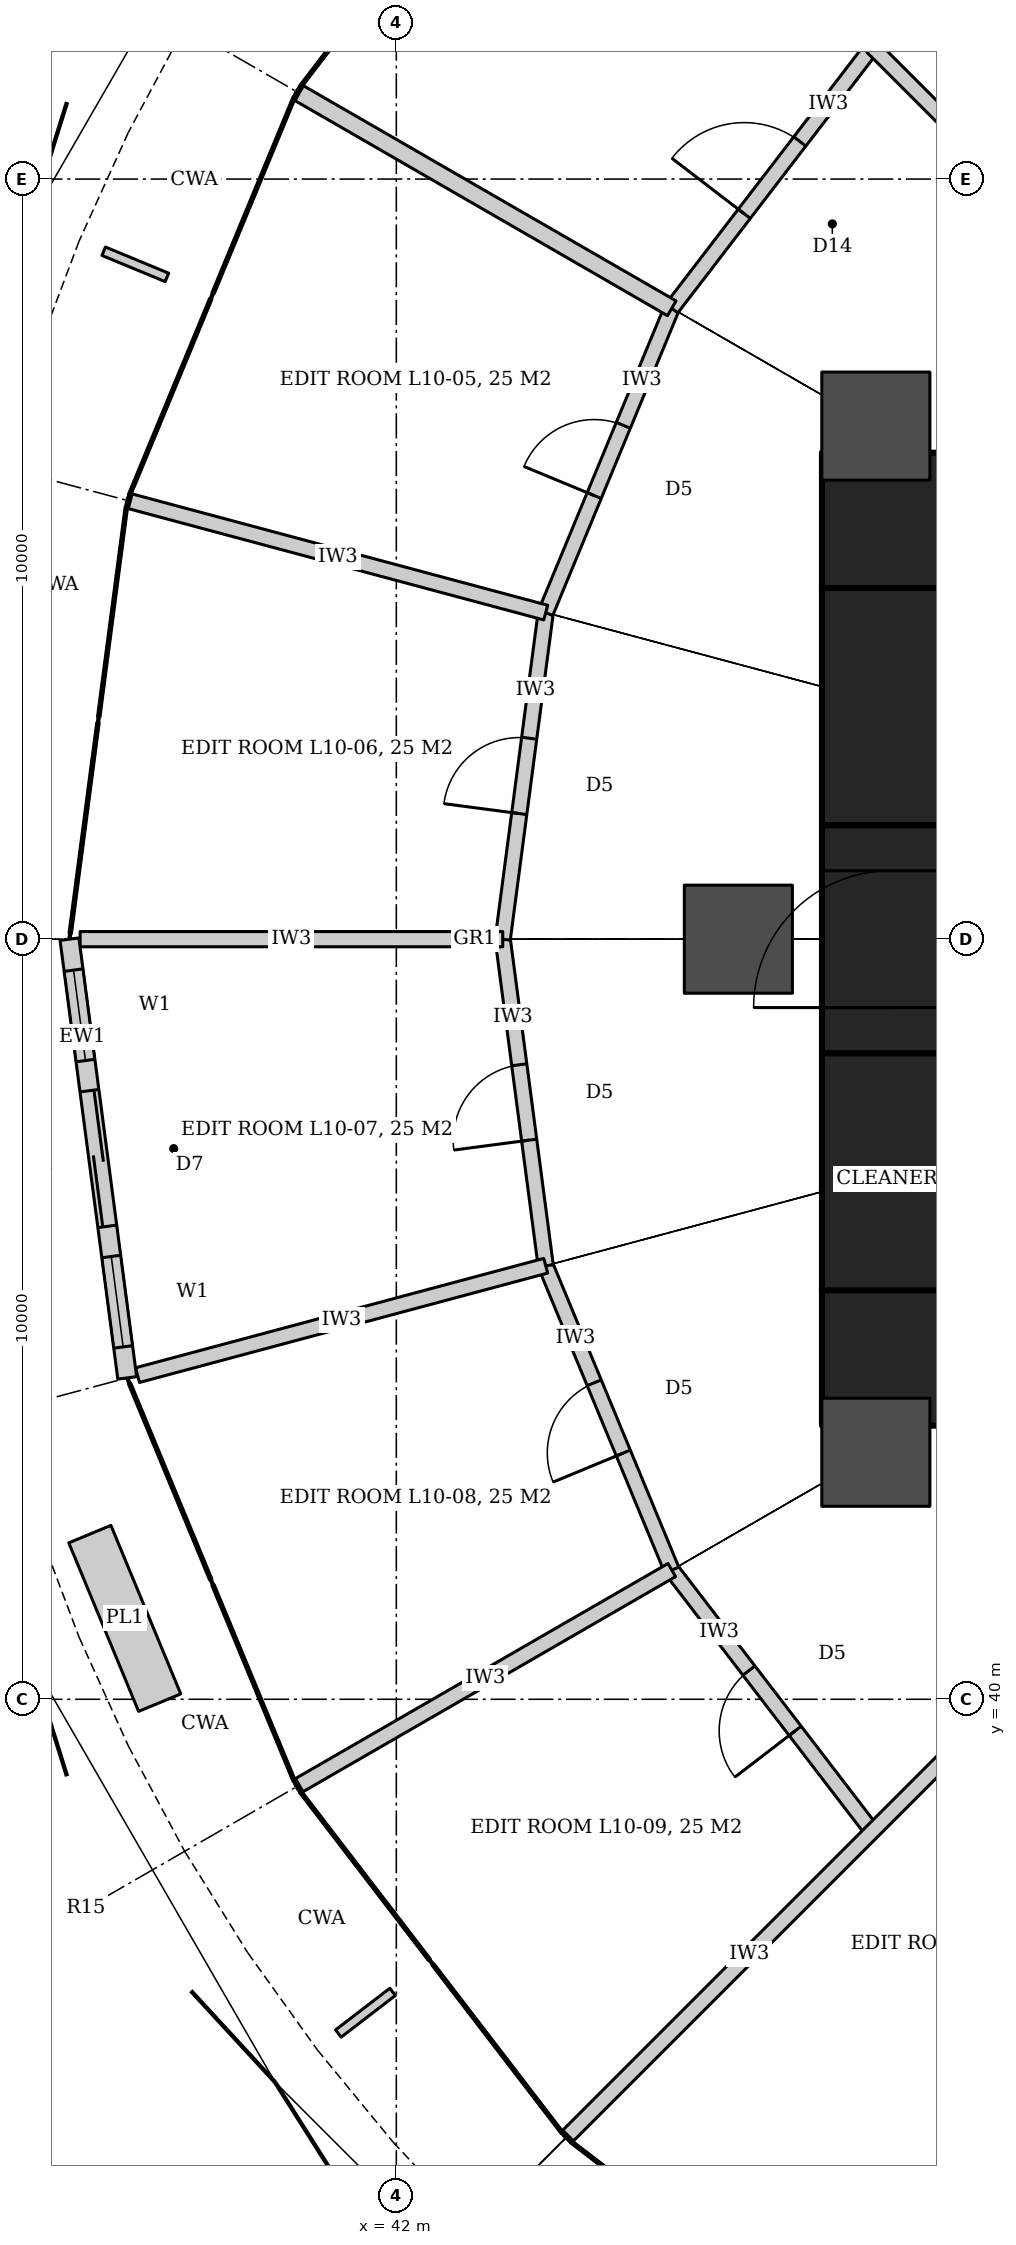
"""IFC4 building model, lengths in metres.
Left out: names, types, materials, properties, quantities, classifications, styles, units other than length and angle.
Written with IfcOpenShell. Run it as: python <this file> out.ifc"""

import sys

from ifc_helpers import new_model, si_unit, direction, frame, frame_2d, origin, origin_2d, place, context, subcontext, project, spatial, rectangle, hollow_circle, extrude, element, fill, save


model = new_model("IFC4")
c1 = context("Model", 3, precision=1e-05, world=origin(), true_north=direction((0.0, 1.0)))
c2 = subcontext(c1, "Body", "Model", "MODEL_VIEW")
j1 = project(units=[si_unit("LENGTHUNIT", "METRE"), si_unit("PLANEANGLEUNIT", "RADIAN")], contexts=[c1])
p1 = place(None, origin())
s1 = spatial("IfcSite", under=j1, at=p1, CompositionType="ELEMENT")
p2 = place(p1, origin())
s2 = spatial("IfcBuilding", under=s1, at=p2, CompositionType="ELEMENT")
p3 = place(p2, frame((0.0, 0.0, 42.8)))
s3 = spatial("IfcBuildingStorey", under=s2, at=p3, CompositionType="ELEMENT", Elevation=42.8)
for number, where, z_axis, x_axis in (
    (1, (47.6, 55.5, 0.0), (0.0, 0.0, 1.0), (1.0, 0.0, 0.0)),
    (2, (47.6, 44.5, 0.0), (0.0, 0.0, 1.0), (1.0, 0.0, 0.0)),
):
    element("IfcWall", number, at=place(p3, frame(where, z_axis=z_axis, x_axis=x_axis)), inside=s3, PredefinedType="SHEAR", context=c2, shape_type="SweptSolid", body=[
        extrude(rectangle(XDim=7.8, YDim=1.8, at=frame_2d((3.9, 0.0))), origin(), (0.0, 0.0, 1.0), 4.2),
    ])
p4 = place(p3, frame((48.5, 45.38, 0.0), z_axis=(0.0, 0.0, 1.0), x_axis=(0.0, 1.0, 0.0)))
e3 = element("IfcWall", 3, at=p4, inside=s3, PredefinedType="SHEAR", context=c2, shape_type="SweptSolid", body=[
    extrude(rectangle(XDim=3.32, YDim=1.8, at=frame_2d((1.66, 0.0))), origin(), (0.0, 0.0, 1.0), 4.2),
])
p5 = place(p3, frame((48.7, 48.7, 0.0), z_axis=(0.0, 0.0, 1.0), x_axis=(0.0, 1.0, 0.0)))
e4 = element("IfcWall", 4, at=p5, inside=s3, PredefinedType="SHEAR", context=c2, shape_type="SweptSolid", body=[
    extrude(rectangle(XDim=2.6, YDim=1.8, at=frame_2d((1.3, 0.0))), origin(), (0.0, 0.0, 1.0), 4.2),
])
p6 = place(p5, frame((0.4, 0.0, 0.0)))
e5 = element("IfcOpeningElement", 5, at=p6, cuts=e4, PredefinedType="OPENING", context=c2, shape_type="SweptSolid", body=[
    extrude(rectangle(XDim=1.8, YDim=2.1, at=frame_2d((0.9, 1.05))), frame((0.0, 0.91, 0.0), z_axis=(0.0, -1.0, 0.0), x_axis=(1.0, 0.0, 0.0)), (0.0, 0.0, 1.0), 1.82),
])
p7 = place(p3, frame((48.5, 51.3, 0.0), z_axis=(0.0, 0.0, 1.0), x_axis=(0.0, 1.0, 0.0)))
e6 = element("IfcWall", 6, at=p7, inside=s3, PredefinedType="SHEAR", context=c2, shape_type="SweptSolid", body=[
    extrude(rectangle(XDim=3.32, YDim=1.8, at=frame_2d((1.66, 0.0))), origin(), (0.0, 0.0, 1.0), 4.2),
])
for number, where, z_axis, x_axis in (
    (7, (48.309, 56.75, 0.0), (0.0, 0.0, 1.0), (1.0, 0.0, 0.0)),
    (8, (46.5, 50.0, 0.0), (0.0, 0.0, 1.0), (1.0, 0.0, 0.0)),
    (9, (48.309, 43.25, 0.0), (0.0, 0.0, 1.0), (1.0, 0.0, 0.0)),
):
    element("IfcColumn", number, at=place(p3, frame(where, z_axis=z_axis, x_axis=x_axis)), inside=s3, PredefinedType="COLUMN", context=c2, shape_type="SweptSolid", body=[
        extrude(hollow_circle(Radius=0.813, WallThickness=0.08, at=origin_2d()), origin(), (0.0, 0.0, 1.0), 4.2),
    ])
p8 = place(p3, frame((48.262, 38.262, 0.0), z_axis=(0.0, 0.0, 1.0), x_axis=(-0.60874374674, 0.79336690806, 0.0)))
e10 = element("IfcWall", 10, at=p8, inside=s3, PredefinedType="PARTITIONING", context=c2, shape_type="SweptSolid", body=[
    extrude(rectangle(XDim=4.333, YDim=0.2, at=frame_2d((2.167, 0.0))), origin(), (0.0, 0.0, 1.0), 3.04),
])
p9 = place(p8, frame((1.667, 0.0, 0.0)))
e11 = element("IfcOpeningElement", 11, at=p9, cuts=e10, PredefinedType="OPENING", context=c2, shape_type="SweptSolid", body=[
    extrude(rectangle(XDim=1.0, YDim=2.1, at=frame_2d((0.5, 1.05))), frame((0.0, 0.11, 0.0), z_axis=(0.0, -1.0, 0.0), x_axis=(1.0, 0.0, 0.0)), (0.0, 0.0, 1.0), 0.22),
])
p10 = place(p3, frame((45.624, 41.7, 0.0), z_axis=(0.0, 0.0, 1.0), x_axis=(-0.382698425325, 0.923873322082, 0.0)))
e12 = element("IfcWall", 12, at=p10, inside=s3, PredefinedType="PARTITIONING", context=c2, shape_type="SweptSolid", body=[
    extrude(rectangle(XDim=4.333, YDim=0.2, at=frame_2d((2.167, 0.0))), origin(), (0.0, 0.0, 1.0), 3.04),
])
p11 = place(p10, frame((1.667, 0.0, 0.0)))
e13 = element("IfcOpeningElement", 13, at=p11, cuts=e12, PredefinedType="OPENING", context=c2, shape_type="SweptSolid", body=[
    extrude(rectangle(XDim=1.0, YDim=2.1, at=frame_2d((0.5, 1.05))), frame((0.0, 0.11, 0.0), z_axis=(0.0, -1.0, 0.0), x_axis=(1.0, 0.0, 0.0)), (0.0, 0.0, 1.0), 0.22),
])
p12 = place(p3, frame((43.966, 45.704, 0.0), z_axis=(0.0, 0.0, 1.0), x_axis=(-0.130536124221, 0.99144355375, 0.0)))
e14 = element("IfcWall", 14, at=p12, inside=s3, PredefinedType="PARTITIONING", context=c2, shape_type="SweptSolid", body=[
    extrude(rectangle(XDim=4.333, YDim=0.2, at=frame_2d((2.167, 0.0))), origin(), (0.0, 0.0, 1.0), 3.04),
])
p13 = place(p12, frame((1.667, 0.0, 0.0)))
e15 = element("IfcOpeningElement", 15, at=p13, cuts=e14, PredefinedType="OPENING", context=c2, shape_type="SweptSolid", body=[
    extrude(rectangle(XDim=1.0, YDim=2.1, at=frame_2d((0.5, 1.05))), frame((0.0, 0.11, 0.0), z_axis=(0.0, -1.0, 0.0), x_axis=(1.0, 0.0, 0.0)), (0.0, 0.0, 1.0), 0.22),
])
p14 = place(p3, frame((43.4, 50.0, 0.0), z_axis=(0.0, 0.0, 1.0), x_axis=(0.130536124221, 0.99144355375, 0.0)))
e16 = element("IfcWall", 16, at=p14, inside=s3, PredefinedType="PARTITIONING", context=c2, shape_type="SweptSolid", body=[
    extrude(rectangle(XDim=4.333, YDim=0.2, at=frame_2d((2.167, 0.0))), origin(), (0.0, 0.0, 1.0), 3.04),
])
p15 = place(p14, frame((1.667, 0.0, 0.0)))
e17 = element("IfcOpeningElement", 17, at=p15, cuts=e16, PredefinedType="OPENING", context=c2, shape_type="SweptSolid", body=[
    extrude(rectangle(XDim=1.0, YDim=2.1, at=frame_2d((0.5, 1.05))), frame((0.0, 0.11, 0.0), z_axis=(0.0, -1.0, 0.0), x_axis=(1.0, 0.0, 0.0)), (0.0, 0.0, 1.0), 0.22),
])
p16 = place(p3, frame((43.966, 54.296, 0.0), z_axis=(0.0, 0.0, 1.0), x_axis=(0.382698425325, 0.923873322082, 0.0)))
e18 = element("IfcWall", 18, at=p16, inside=s3, PredefinedType="PARTITIONING", context=c2, shape_type="SweptSolid", body=[
    extrude(rectangle(XDim=4.333, YDim=0.2, at=frame_2d((2.167, 0.0))), origin(), (0.0, 0.0, 1.0), 3.04),
])
p17 = place(p16, frame((1.667, 0.0, 0.0)))
e19 = element("IfcOpeningElement", 19, at=p17, cuts=e18, PredefinedType="OPENING", context=c2, shape_type="SweptSolid", body=[
    extrude(rectangle(XDim=1.0, YDim=2.1, at=frame_2d((0.5, 1.05))), frame((0.0, 0.11, 0.0), z_axis=(0.0, -1.0, 0.0), x_axis=(1.0, 0.0, 0.0)), (0.0, 0.0, 1.0), 0.22),
])
p18 = place(p3, frame((45.624, 58.3, 0.0), z_axis=(0.0, 0.0, 1.0), x_axis=(0.60874374674, 0.79336690806, 0.0)))
e20 = element("IfcWall", 20, at=p18, inside=s3, PredefinedType="PARTITIONING", context=c2, shape_type="SweptSolid", body=[
    extrude(rectangle(XDim=4.333, YDim=0.2, at=frame_2d((2.167, 0.0))), origin(), (0.0, 0.0, 1.0), 3.04),
])
p19 = place(p18, frame((1.567, 0.0, 0.0)))
e21 = element("IfcOpeningElement", 21, at=p19, cuts=e20, PredefinedType="OPENING", context=c2, shape_type="SweptSolid", body=[
    extrude(rectangle(XDim=1.2, YDim=2.4, at=frame_2d((0.6, 1.2))), frame((0.0, 0.11, 0.0), z_axis=(0.0, -1.0, 0.0), x_axis=(1.0, 0.0, 0.0)), (0.0, 0.0, 1.0), 0.22),
])
p20 = place(p3, frame((48.262, 61.738, 0.0), z_axis=(0.0, 0.0, 1.0), x_axis=(0.707106781187, -0.707106781187, 0.0)))
e22 = element("IfcWall", 22, at=p20, inside=s3, PredefinedType="PARTITIONING", context=c2, shape_type="SweptSolid", body=[
    extrude(rectangle(XDim=3.872, YDim=0.2, at=frame_2d((1.936, 0.0))), origin(), (0.0, 0.0, 1.0), 3.02),
])
p21 = place(p3, frame((45.624, 58.3, 0.0), z_axis=(0.0, 0.0, 1.0), x_axis=(-0.866042189445, 0.499970925255, 0.0)))
e23 = element("IfcWall", 23, at=p21, inside=s3, PredefinedType="PARTITIONING", context=c2, shape_type="SweptSolid", body=[
    extrude(rectangle(XDim=5.16, YDim=0.225, at=frame_2d((2.58, 0.0))), origin(), (0.0, 0.0, 1.0), 3.04),
])
p22 = place(p3, frame((43.966, 54.296, 0.0), z_axis=(0.0, 0.0, 1.0), x_axis=(-0.965927988102, 0.258810976974, 0.0)))
e24 = element("IfcWall", 24, at=p22, inside=s3, PredefinedType="PARTITIONING", context=c2, shape_type="SweptSolid", body=[
    extrude(rectangle(XDim=5.16, YDim=0.2, at=frame_2d((2.58, 0.0))), origin(), (0.0, 0.0, 1.0), 3.04),
])
p23 = place(p3, frame((43.4, 50.0, 0.0), z_axis=(0.0, 0.0, 1.0), x_axis=(-1.0, 0.0, 0.0)))
e25 = element("IfcWall", 25, at=p23, inside=s3, PredefinedType="PARTITIONING", context=c2, shape_type="SweptSolid", body=[
    extrude(rectangle(XDim=5.06, YDim=0.2, at=frame_2d((2.53, 0.0))), origin(), (0.0, 0.0, 1.0), 3.04),
])
p24 = place(p3, frame((43.966, 45.704, 0.0), z_axis=(0.0, 0.0, 1.0), x_axis=(-0.965929961432, -0.258803612044, 0.0)))
e26 = element("IfcWall", 26, at=p24, inside=s3, PredefinedType="PARTITIONING", context=c2, shape_type="SweptSolid", body=[
    extrude(rectangle(XDim=5.06, YDim=0.2, at=frame_2d((2.53, 0.0))), origin(), (0.0, 0.0, 1.0), 3.04),
])
p25 = place(p3, frame((45.624, 41.7, 0.0), z_axis=(0.0, 0.0, 1.0), x_axis=(-0.866042189445, -0.499970925255, 0.0)))
e27 = element("IfcWall", 27, at=p25, inside=s3, PredefinedType="PARTITIONING", context=c2, shape_type="SweptSolid", body=[
    extrude(rectangle(XDim=5.16, YDim=0.2, at=frame_2d((2.58, 0.0))), origin(), (0.0, 0.0, 1.0), 3.04),
])
p26 = place(p3, frame((51.0, 41.0, 0.0), z_axis=(0.0, 0.0, 1.0), x_axis=(-0.707106781187, -0.707106781187, 0.0)))
e28 = element("IfcWall", 28, at=p26, inside=s3, PredefinedType="PARTITIONING", context=c2, shape_type="SweptSolid", body=[
    extrude(rectangle(XDim=9.032, YDim=0.2, at=frame_2d((4.516, 0.0))), origin(), (0.0, 0.0, 1.0), 3.02),
])
p27 = place(p26, frame((1.436, 0.0, 0.0)))
e29 = element("IfcOpeningElement", 29, at=p27, cuts=e28, PredefinedType="OPENING", context=c2, shape_type="SweptSolid", body=[
    extrude(rectangle(XDim=1.0, YDim=2.1, at=frame_2d((0.5, 1.05))), frame((0.0, 0.11, 0.0), z_axis=(0.0, -1.0, 0.0), x_axis=(1.0, 0.0, 0.0)), (0.0, 0.0, 1.0), 0.22),
])
p28 = place(p3, frame((52.701, 37.358, 0.0), z_axis=(0.0, 0.0, 1.0), x_axis=(-0.499970319043, -0.866042539415, 0.0)))
e30 = element("IfcWall", 30, at=p28, inside=s3, PredefinedType="PARTITIONING", context=c2, shape_type="SweptSolid", body=[
    extrude(rectangle(XDim=7.162, YDim=0.225, at=frame_2d((3.581, 0.0))), origin(), (0.0, 0.0, 1.0), 3.04),
])
p29 = place(p3, frame((38.2, 50.0, 0.0), z_axis=(0.0, 0.0, 1.0), x_axis=(0.130542179395, -0.991442756491, 0.0)))
e31 = element("IfcWall", 31, at=p29, inside=s3, PredefinedType="SOLIDWALL", context=c2, shape_type="SweptSolid", body=[
    extrude(rectangle(XDim=5.691, YDim=0.25, at=frame_2d((2.845, 0.0))), origin(), (0.0, 0.0, 1.0), 4.04),
])
p30 = place(p29, frame((1.946, 0.0, 0.0)))
e32 = element("IfcOpeningElement", 32, at=p30, cuts=e31, PredefinedType="OPENING", context=c2, shape_type="SweptSolid", body=[
    extrude(rectangle(XDim=1.8, YDim=2.4, at=frame_2d((0.9, 1.2))), frame((0.0, 0.135, 0.0), z_axis=(0.0, -1.0, 0.0), x_axis=(1.0, 0.0, 0.0)), (0.0, 0.0, 1.0), 0.27),
])
p31 = place(p29, frame((0.345, 0.0, 0.0)))
e33 = element("IfcOpeningElement", 33, at=p31, cuts=e31, PredefinedType="OPENING", context=c2, shape_type="SweptSolid", body=[
    extrude(rectangle(XDim=1.2, YDim=2.4, at=frame_2d((0.6, 1.2))), frame((0.0, 0.135, 0.0), z_axis=(0.0, -1.0, 0.0), x_axis=(1.0, 0.0, 0.0)), (0.0, 0.0, 1.0), 0.27),
])
p32 = place(p29, frame((4.146, 0.0, 0.0)))
e34 = element("IfcOpeningElement", 34, at=p32, cuts=e31, PredefinedType="OPENING", context=c2, shape_type="SweptSolid", body=[
    extrude(rectangle(XDim=1.2, YDim=2.4, at=frame_2d((0.6, 1.2))), frame((0.0, 0.135, 0.0), z_axis=(0.0, -1.0, 0.0), x_axis=(1.0, 0.0, 0.0)), (0.0, 0.0, 1.0), 0.27),
])
p33 = place(p19, origin())
e35 = element("IfcDoor", 35, at=p33, inside=s3, OperationType="SINGLE_SWING_LEFT", PredefinedType="DOOR", context=c2, shape_type="SweptSolid", body=[
    extrude(rectangle(XDim=1.2, YDim=2.4, at=frame_2d((0.6, 1.2))), frame((0.0, 0.025, 0.0), z_axis=(0.0, -1.0, 0.0), x_axis=(1.0, 0.0, 0.0)), (0.0, 0.0, 1.0), 0.05),
])
fill(e21, e35)
p34 = place(p17, origin())
e36 = element("IfcDoor", 36, at=p34, inside=s3, OperationType="SINGLE_SWING_LEFT", PredefinedType="DOOR", context=c2, shape_type="SweptSolid", body=[
    extrude(rectangle(XDim=1.0, YDim=2.1, at=frame_2d((0.5, 1.05))), frame((0.0, 0.025, 0.0), z_axis=(0.0, -1.0, 0.0), x_axis=(1.0, 0.0, 0.0)), (0.0, 0.0, 1.0), 0.05),
])
fill(e19, e36)
p35 = place(p15, origin())
e37 = element("IfcDoor", 37, at=p35, inside=s3, OperationType="SINGLE_SWING_LEFT", PredefinedType="DOOR", context=c2, shape_type="SweptSolid", body=[
    extrude(rectangle(XDim=1.0, YDim=2.1, at=frame_2d((0.5, 1.05))), frame((0.0, 0.025, 0.0), z_axis=(0.0, -1.0, 0.0), x_axis=(1.0, 0.0, 0.0)), (0.0, 0.0, 1.0), 0.05),
])
fill(e17, e37)
p36 = place(p13, origin())
e38 = element("IfcDoor", 38, at=p36, inside=s3, OperationType="SINGLE_SWING_LEFT", PredefinedType="DOOR", context=c2, shape_type="SweptSolid", body=[
    extrude(rectangle(XDim=1.0, YDim=2.1, at=frame_2d((0.5, 1.05))), frame((0.0, 0.025, 0.0), z_axis=(0.0, -1.0, 0.0), x_axis=(1.0, 0.0, 0.0)), (0.0, 0.0, 1.0), 0.05),
])
fill(e15, e38)
p37 = place(p11, origin())
e39 = element("IfcDoor", 39, at=p37, inside=s3, OperationType="SINGLE_SWING_LEFT", PredefinedType="DOOR", context=c2, shape_type="SweptSolid", body=[
    extrude(rectangle(XDim=1.0, YDim=2.1, at=frame_2d((0.5, 1.05))), frame((0.0, 0.025, 0.0), z_axis=(0.0, -1.0, 0.0), x_axis=(1.0, 0.0, 0.0)), (0.0, 0.0, 1.0), 0.05),
])
fill(e13, e39)
p38 = place(p9, origin())
e40 = element("IfcDoor", 40, at=p38, inside=s3, OperationType="SINGLE_SWING_LEFT", PredefinedType="DOOR", context=c2, shape_type="SweptSolid", body=[
    extrude(rectangle(XDim=1.0, YDim=2.1, at=frame_2d((0.5, 1.05))), frame((0.0, 0.025, 0.0), z_axis=(0.0, -1.0, 0.0), x_axis=(1.0, 0.0, 0.0)), (0.0, 0.0, 1.0), 0.05),
])
fill(e11, e40)
p39 = place(p30, origin())
e41 = element("IfcDoor", 41, at=p39, inside=s3, OperationType="DOUBLE_DOOR_SLIDING", PredefinedType="DOOR", context=c2, shape_type="SweptSolid", body=[
    extrude(rectangle(XDim=1.8, YDim=2.4, at=frame_2d((0.9, 1.2))), frame((0.0, 0.025, 0.0), z_axis=(0.0, -1.0, 0.0), x_axis=(1.0, 0.0, 0.0)), (0.0, 0.0, 1.0), 0.05),
])
fill(e32, e41)
p40 = place(p31, origin())
e42 = element("IfcWindow", 42, at=p40, inside=s3, PartitioningType="SINGLE_PANEL", PredefinedType="WINDOW", context=c2, shape_type="SweptSolid", body=[
    extrude(rectangle(XDim=1.2, YDim=2.4, at=frame_2d((0.6, 1.2))), frame((0.0, 0.03, 0.0), z_axis=(0.0, -1.0, 0.0), x_axis=(1.0, 0.0, 0.0)), (0.0, 0.0, 1.0), 0.06),
])
fill(e33, e42)
p41 = place(p32, origin())
e43 = element("IfcWindow", 43, at=p41, inside=s3, PartitioningType="SINGLE_PANEL", PredefinedType="WINDOW", context=c2, shape_type="SweptSolid", body=[
    extrude(rectangle(XDim=1.2, YDim=2.4, at=frame_2d((0.6, 1.2))), frame((0.0, 0.03, 0.0), z_axis=(0.0, -1.0, 0.0), x_axis=(1.0, 0.0, 0.0)), (0.0, 0.0, 1.0), 0.06),
])
fill(e34, e43)
p42 = place(p6, origin())
e44 = element("IfcDoor", 44, at=p42, inside=s3, OperationType="DOUBLE_DOOR_DOUBLE_SWING", PredefinedType="DOOR", context=c2, shape_type="SweptSolid", body=[
    extrude(rectangle(XDim=1.8, YDim=2.1, at=frame_2d((0.9, 1.05))), frame((0.0, 0.025, 0.0), z_axis=(0.0, -1.0, 0.0), x_axis=(1.0, 0.0, 0.0)), (0.0, 0.0, 1.0), 0.05),
])
fill(e5, e44)
save(model, sys.argv[1])
